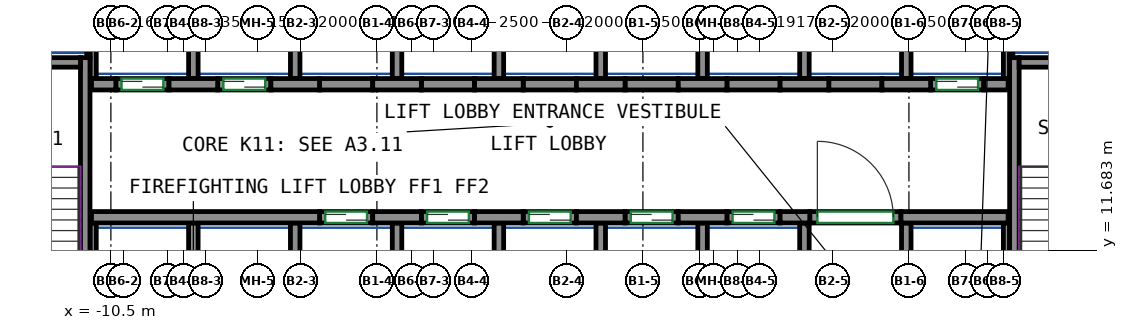
"""IFC4 building model, lengths in metres.
Left out: names, types, materials, properties, quantities, classifications, styles, units other than length and angle.
Written with IfcOpenShell. Run it as: python <this file> out.ifc"""

import sys

from ifc_helpers import new_model, si_unit, direction, frame, frame_2d, origin, place, context, subcontext, project, spatial, rectangle, extrude, source, transform, mapped, element, fill, save


model = new_model("IFC4")
c1 = context("Model", 3, precision=1e-05, world=origin(), true_north=direction((0.0, 1.0)))
c2 = subcontext(c1, "Body", "Model", "MODEL_VIEW")
j1 = project(units=[si_unit("LENGTHUNIT", "METRE"), si_unit("PLANEANGLEUNIT", "RADIAN")], contexts=[c1])
p1 = place(None, origin())
s1 = spatial("IfcSite", under=j1, at=p1, CompositionType="ELEMENT")
p2 = place(p1, origin())
s2 = spatial("IfcBuilding", under=s1, at=p2, CompositionType="ELEMENT")
p3 = place(p2, frame((0.0, 0.0, 47.0)))
s3 = spatial("IfcBuildingStorey", under=s2, at=p3, CompositionType="ELEMENT", Elevation=47.0)
m1 = source(origin(), c2, "Body", "SweptSolid", [
    extrude(rectangle(XDim=7.75, YDim=0.25, at=frame_2d((3.875, 0.0))), origin(), (0.0, 0.0, 1.0), 3.72),
])
p4 = place(p3, frame((-11.175, 9.0, 0.0), z_axis=(0.0, 0.0, 1.0), x_axis=(0.0, 1.0, 0.0)))
e1 = element("IfcWall", 1, at=p4, inside=s3, PredefinedType="SHEAR", context=c2, shape_type="MappedRepresentation", body=[
    mapped(m1, transform((0.0, 0.0, 0.0))),
])
m2 = source(origin(), c2, "Body", "SweptSolid", [
    extrude(rectangle(XDim=3.7, YDim=0.25, at=frame_2d((1.85, 0.0))), origin(), (0.0, 0.0, 1.0), 3.72),
])
p5 = place(p3, frame((-15.0, 16.625, 0.0), z_axis=(0.0, 0.0, 1.0), x_axis=(1.0, 0.0, 0.0)))
e2 = element("IfcWall", 2, at=p5, inside=s3, PredefinedType="SHEAR", context=c2, shape_type="MappedRepresentation", body=[
    mapped(m2, transform((0.0, 0.0, 0.0))),
])
p6 = place(p3, frame((13.275, 9.0, 0.0), z_axis=(0.0, 0.0, 1.0), x_axis=(0.0, 1.0, 0.0)))
e3 = element("IfcWall", 3, at=p6, inside=s3, PredefinedType="SHEAR", context=c2, shape_type="MappedRepresentation", body=[
    mapped(m1, transform((0.0, 0.0, 0.0))),
])
m3 = source(origin(), c2, "Body", "SweptSolid", [
    extrude(rectangle(XDim=3.7, YDim=0.25, at=frame_2d((1.85, 0.0))), origin(), (0.0, 0.0, 1.0), 3.72),
])
p7 = place(p3, frame((13.4, 16.625, 0.0), z_axis=(0.0, 0.0, 1.0), x_axis=(1.0, 0.0, 0.0)))
e4 = element("IfcWall", 4, at=p7, inside=s3, PredefinedType="SHEAR", context=c2, shape_type="MappedRepresentation", body=[
    mapped(m3, transform((0.0, 0.0, 0.0))),
])
m4 = source(origin(), c2, "Body", "SweptSolid", [
    extrude(rectangle(XDim=6.0, YDim=0.3, at=frame_2d((3.0, 0.0))), origin(), (0.0, 0.0, 1.0), 3.72),
])
p8 = place(p3, frame((-11.01, 12.55, 0.0), z_axis=(0.0, 0.0, 1.0), x_axis=(1.0, 0.0, 0.0)))
e5 = element("IfcWall", 5, at=p8, inside=s3, PredefinedType="SHEAR", context=c2, shape_type="MappedRepresentation", body=[
    mapped(m4, transform((0.0, 0.0, 0.0))),
])
m5 = source(origin(), c2, "Body", "SweptSolid", [
    extrude(rectangle(XDim=1.28, YDim=0.3, at=frame_2d((0.64, 0.0))), origin(), (0.0, 0.0, 1.0), 3.72),
])
for number, where, z_axis, x_axis in (
    (6, (-3.61, 12.55, 0.0), (0.0, 0.0, 1.0), (1.0, 0.0, 0.0)),
    (7, (-0.93, 12.55, 0.0), (0.0, 0.0, 1.0), (1.0, 0.0, 0.0)),
    (8, (1.75, 12.55, 0.0), (0.0, 0.0, 1.0), (1.0, 0.0, 0.0)),
    (9, (4.43, 12.55, 0.0), (0.0, 0.0, 1.0), (1.0, 0.0, 0.0)),
):
    element("IfcWall", number, at=place(p3, frame(where, z_axis=z_axis, x_axis=x_axis)), inside=s3, PredefinedType="SHEAR", context=c2, shape_type="MappedRepresentation", body=[
        mapped(m5, transform((0.0, 0.0, 0.0))),
    ])
m6 = source(origin(), c2, "Body", "SweptSolid", [
    extrude(rectangle(XDim=0.78, YDim=0.3, at=frame_2d((0.39, 0.0))), origin(), (0.0, 0.0, 1.0), 3.72),
])
p9 = place(p3, frame((7.11, 12.55, 0.0), z_axis=(0.0, 0.0, 1.0), x_axis=(1.0, 0.0, 0.0)))
e10 = element("IfcWall", 10, at=p9, inside=s3, PredefinedType="SHEAR", context=c2, shape_type="MappedRepresentation", body=[
    mapped(m6, transform((0.0, 0.0, 0.0))),
])
m7 = source(origin(), c2, "Body", "SweptSolid", [
    extrude(rectangle(XDim=2.82, YDim=0.3, at=frame_2d((1.41, 0.0))), origin(), (0.0, 0.0, 1.0), 3.72),
])
p10 = place(p3, frame((10.29, 12.55, 0.0), z_axis=(0.0, 0.0, 1.0), x_axis=(1.0, 0.0, 0.0)))
e11 = element("IfcWall", 11, at=p10, inside=s3, PredefinedType="SHEAR", context=c2, shape_type="MappedRepresentation", body=[
    mapped(m7, transform((0.0, 0.0, 0.0))),
])
m8 = source(origin(), c2, "Body", "SweptSolid", [
    extrude(rectangle(XDim=0.64, YDim=0.3, at=frame_2d((0.32, 0.0))), origin(), (0.0, 0.0, 1.0), 3.72),
])
p11 = place(p3, frame((-11.01, 16.05, 0.0), z_axis=(0.0, 0.0, 1.0), x_axis=(1.0, 0.0, 0.0)))
e12 = element("IfcWall", 12, at=p11, inside=s3, PredefinedType="SHEAR", context=c2, shape_type="MappedRepresentation", body=[
    mapped(m8, transform((0.0, 0.0, 0.0))),
])
for number, where, z_axis, x_axis in (
    (13, (-8.97, 16.05, 0.0), (0.0, 0.0, 1.0), (1.0, 0.0, 0.0)),
    (14, (-6.29, 16.05, 0.0), (0.0, 0.0, 1.0), (1.0, 0.0, 0.0)),
    (15, (-3.61, 16.05, 0.0), (0.0, 0.0, 1.0), (1.0, 0.0, 0.0)),
    (16, (-0.93, 16.05, 0.0), (0.0, 0.0, 1.0), (1.0, 0.0, 0.0)),
    (17, (1.75, 16.05, 0.0), (0.0, 0.0, 1.0), (1.0, 0.0, 0.0)),
    (18, (4.43, 16.05, 0.0), (0.0, 0.0, 1.0), (1.0, 0.0, 0.0)),
):
    element("IfcWall", number, at=place(p3, frame(where, z_axis=z_axis, x_axis=x_axis)), inside=s3, PredefinedType="SHEAR", context=c2, shape_type="MappedRepresentation", body=[
        mapped(m5, transform((0.0, 0.0, 0.0))),
    ])
m9 = source(origin(), c2, "Body", "SweptSolid", [
    extrude(rectangle(XDim=1.28, YDim=0.3, at=frame_2d((0.64, 0.0))), origin(), (0.0, 0.0, 1.0), 3.72),
])
p12 = place(p3, frame((7.11, 16.05, 0.0), z_axis=(0.0, 0.0, 1.0), x_axis=(1.0, 0.0, 0.0)))
e19 = element("IfcWall", 19, at=p12, inside=s3, PredefinedType="SHEAR", context=c2, shape_type="MappedRepresentation", body=[
    mapped(m9, transform((0.0, 0.0, 0.0))),
])
p13 = place(p3, frame((9.79, 16.05, 0.0), z_axis=(0.0, 0.0, 1.0), x_axis=(1.0, 0.0, 0.0)))
e20 = element("IfcWall", 20, at=p13, inside=s3, PredefinedType="SHEAR", context=c2, shape_type="MappedRepresentation", body=[
    mapped(m5, transform((0.0, 0.0, 0.0))),
])
m10 = source(origin(), c2, "Body", "SweptSolid", [
    extrude(rectangle(XDim=0.64, YDim=0.3, at=frame_2d((0.32, 0.0))), origin(), (0.0, 0.0, 1.0), 3.72),
])
p14 = place(p3, frame((12.47, 16.05, 0.0), z_axis=(0.0, 0.0, 1.0), x_axis=(1.0, 0.0, 0.0)))
e21 = element("IfcWall", 21, at=p14, inside=s3, PredefinedType="SHEAR", context=c2, shape_type="MappedRepresentation", body=[
    mapped(m10, transform((0.0, 0.0, 0.0))),
])
m11 = source(origin(), c2, "Body", "SweptSolid", [
    extrude(rectangle(XDim=1.4, YDim=0.3, at=frame_2d((0.7, 0.0))), origin(), (0.0, 0.0, 1.0), 3.72),
])
p15 = place(p3, frame((-5.01, 12.55, 0.0), z_axis=(0.0, 0.0, 1.0), x_axis=(1.0, 0.0, 0.0)))
e22 = element("IfcWall", 22, at=p15, inside=s3, PredefinedType="PARTITIONING", context=c2, shape_type="MappedRepresentation", body=[
    mapped(m11, transform((0.0, 0.0, 0.0))),
])
p16 = place(p15, frame((0.15, 0.0, 0.0)))
e23 = element("IfcOpeningElement", 23, at=p16, cuts=e22, PredefinedType="OPENING", context=c2, shape_type="SweptSolid", body=[
    extrude(rectangle(XDim=1.1, YDim=2.1, at=frame_2d((0.55, 1.05))), frame((0.0, 0.16, 0.0), z_axis=(0.0, -1.0, 0.0), x_axis=(1.0, 0.0, 0.0)), (0.0, 0.0, 1.0), 0.32),
])
m12 = source(origin(), c2, "Body", "SweptSolid", [
    extrude(rectangle(XDim=1.4, YDim=0.3, at=frame_2d((0.7, 0.0))), origin(), (0.0, 0.0, 1.0), 3.72),
])
p17 = place(p3, frame((-2.33, 12.55, 0.0), z_axis=(0.0, 0.0, 1.0), x_axis=(1.0, 0.0, 0.0)))
e24 = element("IfcWall", 24, at=p17, inside=s3, PredefinedType="PARTITIONING", context=c2, shape_type="MappedRepresentation", body=[
    mapped(m12, transform((0.0, 0.0, 0.0))),
])
p18 = place(p17, frame((0.15, 0.0, 0.0)))
e25 = element("IfcOpeningElement", 25, at=p18, cuts=e24, PredefinedType="OPENING", context=c2, shape_type="SweptSolid", body=[
    extrude(rectangle(XDim=1.1, YDim=2.1, at=frame_2d((0.55, 1.05))), frame((0.0, 0.16, 0.0), z_axis=(0.0, -1.0, 0.0), x_axis=(1.0, 0.0, 0.0)), (0.0, 0.0, 1.0), 0.32),
])
p19 = place(p3, frame((0.35, 12.55, 0.0), z_axis=(0.0, 0.0, 1.0), x_axis=(1.0, 0.0, 0.0)))
e26 = element("IfcWall", 26, at=p19, inside=s3, PredefinedType="PARTITIONING", context=c2, shape_type="MappedRepresentation", body=[
    mapped(m11, transform((0.0, 0.0, 0.0))),
])
p20 = place(p19, frame((0.15, 0.0, 0.0)))
e27 = element("IfcOpeningElement", 27, at=p20, cuts=e26, PredefinedType="OPENING", context=c2, shape_type="SweptSolid", body=[
    extrude(rectangle(XDim=1.1, YDim=2.1, at=frame_2d((0.55, 1.05))), frame((0.0, 0.16, 0.0), z_axis=(0.0, -1.0, 0.0), x_axis=(1.0, 0.0, 0.0)), (0.0, 0.0, 1.0), 0.32),
])
p21 = place(p3, frame((3.03, 12.55, 0.0), z_axis=(0.0, 0.0, 1.0), x_axis=(1.0, 0.0, 0.0)))
e28 = element("IfcWall", 28, at=p21, inside=s3, PredefinedType="PARTITIONING", context=c2, shape_type="MappedRepresentation", body=[
    mapped(m11, transform((0.0, 0.0, 0.0))),
])
p22 = place(p21, frame((0.15, 0.0, 0.0)))
e29 = element("IfcOpeningElement", 29, at=p22, cuts=e28, PredefinedType="OPENING", context=c2, shape_type="SweptSolid", body=[
    extrude(rectangle(XDim=1.1, YDim=2.1, at=frame_2d((0.55, 1.05))), frame((0.0, 0.16, 0.0), z_axis=(0.0, -1.0, 0.0), x_axis=(1.0, 0.0, 0.0)), (0.0, 0.0, 1.0), 0.32),
])
p23 = place(p3, frame((5.71, 12.55, 0.0), z_axis=(0.0, 0.0, 1.0), x_axis=(1.0, 0.0, 0.0)))
e30 = element("IfcWall", 30, at=p23, inside=s3, PredefinedType="PARTITIONING", context=c2, shape_type="MappedRepresentation", body=[
    mapped(m12, transform((0.0, 0.0, 0.0))),
])
p24 = place(p23, frame((0.15, 0.0, 0.0)))
e31 = element("IfcOpeningElement", 31, at=p24, cuts=e30, PredefinedType="OPENING", context=c2, shape_type="SweptSolid", body=[
    extrude(rectangle(XDim=1.1, YDim=2.1, at=frame_2d((0.55, 1.05))), frame((0.0, 0.16, 0.0), z_axis=(0.0, -1.0, 0.0), x_axis=(1.0, 0.0, 0.0)), (0.0, 0.0, 1.0), 0.32),
])
p25 = place(p3, frame((11.07, 16.05, 0.0), z_axis=(0.0, 0.0, 1.0), x_axis=(1.0, 0.0, 0.0)))
e32 = element("IfcWall", 32, at=p25, inside=s3, PredefinedType="PARTITIONING", context=c2, shape_type="MappedRepresentation", body=[
    mapped(m11, transform((0.0, 0.0, 0.0))),
])
p26 = place(p25, frame((0.15, 0.0, 0.0)))
e33 = element("IfcOpeningElement", 33, at=p26, cuts=e32, PredefinedType="OPENING", context=c2, shape_type="SweptSolid", body=[
    extrude(rectangle(XDim=1.1, YDim=2.1, at=frame_2d((0.55, 1.05))), frame((0.0, 0.16, 0.0), z_axis=(0.0, -1.0, 0.0), x_axis=(1.0, 0.0, 0.0)), (0.0, 0.0, 1.0), 0.32),
])
p27 = place(p3, frame((-10.37, 16.05, 0.0), z_axis=(0.0, 0.0, 1.0), x_axis=(1.0, 0.0, 0.0)))
e34 = element("IfcWall", 34, at=p27, inside=s3, PredefinedType="PARTITIONING", context=c2, shape_type="MappedRepresentation", body=[
    mapped(m12, transform((0.0, 0.0, 0.0))),
])
p28 = place(p27, frame((0.15, 0.0, 0.0)))
e35 = element("IfcOpeningElement", 35, at=p28, cuts=e34, PredefinedType="OPENING", context=c2, shape_type="SweptSolid", body=[
    extrude(rectangle(XDim=1.1, YDim=2.1, at=frame_2d((0.55, 1.05))), frame((0.0, 0.16, 0.0), z_axis=(0.0, -1.0, 0.0), x_axis=(1.0, 0.0, 0.0)), (0.0, 0.0, 1.0), 0.32),
])
p29 = place(p3, frame((-7.69, 16.05, 0.0), z_axis=(0.0, 0.0, 1.0), x_axis=(1.0, 0.0, 0.0)))
e36 = element("IfcWall", 36, at=p29, inside=s3, PredefinedType="PARTITIONING", context=c2, shape_type="MappedRepresentation", body=[
    mapped(m11, transform((0.0, 0.0, 0.0))),
])
p30 = place(p29, frame((0.15, 0.0, 0.0)))
e37 = element("IfcOpeningElement", 37, at=p30, cuts=e36, PredefinedType="OPENING", context=c2, shape_type="SweptSolid", body=[
    extrude(rectangle(XDim=1.1, YDim=2.1, at=frame_2d((0.55, 1.05))), frame((0.0, 0.16, 0.0), z_axis=(0.0, -1.0, 0.0), x_axis=(1.0, 0.0, 0.0)), (0.0, 0.0, 1.0), 0.32),
])
m13 = source(origin(), c2, "Body", "SweptSolid", [
    extrude(rectangle(XDim=2.4, YDim=0.3, at=frame_2d((1.2, 0.0))), origin(), (0.0, 0.0, 1.0), 3.72),
])
p31 = place(p3, frame((7.89, 12.55, 0.0), z_axis=(0.0, 0.0, 1.0), x_axis=(1.0, 0.0, 0.0)))
e38 = element("IfcWall", 38, at=p31, inside=s3, PredefinedType="PARTITIONING", context=c2, shape_type="MappedRepresentation", body=[
    mapped(m13, transform((0.0, 0.0, 0.0))),
])
p32 = place(p31, frame((0.2, 0.0, 0.0)))
e39 = element("IfcOpeningElement", 39, at=p32, cuts=e38, PredefinedType="OPENING", context=c2, shape_type="SweptSolid", body=[
    extrude(rectangle(XDim=2.0, YDim=2.1, at=frame_2d((1.0, 1.05))), frame((0.0, 0.16, 0.0), z_axis=(0.0, -1.0, 0.0), x_axis=(1.0, 0.0, 0.0)), (0.0, 0.0, 1.0), 0.32),
])
p33 = place(p3, frame((-5.01, 16.05, 0.0), z_axis=(0.0, 0.0, 1.0), x_axis=(1.0, 0.0, 0.0)))
e40 = element("IfcWall", 40, at=p33, inside=s3, PredefinedType="PARTITIONING", context=c2, shape_type="MappedRepresentation", body=[
    mapped(m11, transform((0.0, 0.0, 0.0))),
])
p34 = place(p3, frame((-2.33, 16.05, 0.0), z_axis=(0.0, 0.0, 1.0), x_axis=(1.0, 0.0, 0.0)))
e41 = element("IfcWall", 41, at=p34, inside=s3, PredefinedType="PARTITIONING", context=c2, shape_type="MappedRepresentation", body=[
    mapped(m12, transform((0.0, 0.0, 0.0))),
])
for number, where, z_axis, x_axis in (
    (42, (0.35, 16.05, 0.0), (0.0, 0.0, 1.0), (1.0, 0.0, 0.0)),
    (43, (3.03, 16.05, 0.0), (0.0, 0.0, 1.0), (1.0, 0.0, 0.0)),
):
    element("IfcWall", number, at=place(p3, frame(where, z_axis=z_axis, x_axis=x_axis)), inside=s3, PredefinedType="PARTITIONING", context=c2, shape_type="MappedRepresentation", body=[
        mapped(m11, transform((0.0, 0.0, 0.0))),
    ])
for number, where, z_axis, x_axis in (
    (44, (5.71, 16.05, 0.0), (0.0, 0.0, 1.0), (1.0, 0.0, 0.0)),
    (45, (8.39, 16.05, 0.0), (0.0, 0.0, 1.0), (1.0, 0.0, 0.0)),
):
    element("IfcWall", number, at=place(p3, frame(where, z_axis=z_axis, x_axis=x_axis)), inside=s3, PredefinedType="PARTITIONING", context=c2, shape_type="MappedRepresentation", body=[
        mapped(m12, transform((0.0, 0.0, 0.0))),
    ])
m14 = source(origin(), c2, "Body", "SweptSolid", [
    extrude(rectangle(XDim=3.275, YDim=0.165, at=frame_2d((1.638, 0.0))), origin(), (0.0, 0.0, 1.0), 3.72),
])
for number, where, z_axis, x_axis in (
    (46, (13.067, 16.2, 0.0), (0.0, 0.0, 1.0), (0.0, 1.0, 0.0)),
    (47, (-10.968, 16.2, 0.0), (0.0, 0.0, 1.0), (0.0, 1.0, 0.0)),
):
    element("IfcWall", number, at=place(p3, frame(where, z_axis=z_axis, x_axis=x_axis)), inside=s3, PredefinedType="PARTITIONING", context=c2, shape_type="MappedRepresentation", body=[
        mapped(m14, transform((0.0, 0.0, 0.0))),
    ])
m15 = source(origin(), c2, "Body", "SweptSolid", [
    extrude(rectangle(XDim=3.275, YDim=0.25, at=frame_2d((1.638, 0.0))), origin(), (0.0, 0.0, 1.0), 3.72),
])
p35 = place(p3, frame((10.43, 16.2, 0.0), z_axis=(0.0, 0.0, 1.0), x_axis=(0.0, 1.0, 0.0)))
e48 = element("IfcWall", 48, at=p35, inside=s3, PredefinedType="PARTITIONING", context=c2, shape_type="MappedRepresentation", body=[
    mapped(m15, transform((0.0, 0.0, 0.0))),
])
m16 = source(origin(), c2, "Body", "SweptSolid", [
    extrude(rectangle(XDim=2.725, YDim=0.085, at=frame_2d((1.363, 0.0))), origin(), (0.0, 0.0, 1.0), 3.72),
])
p36 = place(p3, frame((13.192, 16.75, 0.0), z_axis=(0.0, 0.0, 1.0), x_axis=(0.0, 1.0, 0.0)))
e49 = element("IfcWall", 49, at=p36, inside=s3, PredefinedType="PARTITIONING", context=c2, shape_type="MappedRepresentation", body=[
    mapped(m16, transform((0.0, 0.0, 0.0))),
])
for number, where, z_axis, x_axis in (
    (50, (2.39, 16.2, 0.0), (0.0, 0.0, 1.0), (0.0, 1.0, 0.0)),
    (51, (5.07, 16.2, 0.0), (0.0, 0.0, 1.0), (0.0, 1.0, 0.0)),
    (52, (7.75, 16.2, 0.0), (0.0, 0.0, 1.0), (0.0, 1.0, 0.0)),
    (53, (-0.29, 16.2, 0.0), (0.0, 0.0, 1.0), (0.0, 1.0, 0.0)),
):
    element("IfcWall", number, at=place(p3, frame(where, z_axis=z_axis, x_axis=x_axis)), inside=s3, PredefinedType="PARTITIONING", context=c2, shape_type="MappedRepresentation", body=[
        mapped(m15, transform((0.0, 0.0, 0.0))),
    ])
p37 = place(p3, frame((-11.093, 16.75, 0.0), z_axis=(0.0, 0.0, 1.0), x_axis=(0.0, 1.0, 0.0)))
e54 = element("IfcWall", 54, at=p37, inside=s3, PredefinedType="PARTITIONING", context=c2, shape_type="MappedRepresentation", body=[
    mapped(m16, transform((0.0, 0.0, 0.0))),
])
for number, where, z_axis, x_axis in (
    (55, (-2.97, 16.2, 0.0), (0.0, 0.0, 1.0), (0.0, 1.0, 0.0)),
    (56, (-5.65, 16.2, 0.0), (0.0, 0.0, 1.0), (0.0, 1.0, 0.0)),
    (57, (-8.33, 16.2, 0.0), (0.0, 0.0, 1.0), (0.0, 1.0, 0.0)),
):
    element("IfcWall", number, at=place(p3, frame(where, z_axis=z_axis, x_axis=x_axis)), inside=s3, PredefinedType="PARTITIONING", context=c2, shape_type="MappedRepresentation", body=[
        mapped(m15, transform((0.0, 0.0, 0.0))),
    ])
m17 = source(origin(), c2, "Body", "SweptSolid", [
    extrude(rectangle(XDim=3.4, YDim=0.25, at=frame_2d((1.7, 0.0))), origin(), (0.0, 0.0, 1.0), 3.72),
])
p38 = place(p3, frame((10.43, 9.0, 0.0), z_axis=(0.0, 0.0, 1.0), x_axis=(0.0, 1.0, 0.0)))
e58 = element("IfcWall", 58, at=p38, inside=s3, PredefinedType="PARTITIONING", context=c2, shape_type="MappedRepresentation", body=[
    mapped(m17, transform((0.0, 0.0, 0.0))),
])
m18 = source(origin(), c2, "Body", "SweptSolid", [
    extrude(rectangle(XDim=3.4, YDim=0.165, at=frame_2d((1.7, 0.0))), origin(), (0.0, 0.0, 1.0), 3.72),
])
p39 = place(p3, frame((13.067, 9.0, 0.0), z_axis=(0.0, 0.0, 1.0), x_axis=(0.0, 1.0, 0.0)))
e59 = element("IfcWall", 59, at=p39, inside=s3, PredefinedType="PARTITIONING", context=c2, shape_type="MappedRepresentation", body=[
    mapped(m18, transform((0.0, 0.0, 0.0))),
])
for number, where, z_axis, x_axis in (
    (60, (2.39, 9.0, 0.0), (0.0, 0.0, 1.0), (0.0, 1.0, 0.0)),
    (61, (5.07, 9.0, 0.0), (0.0, 0.0, 1.0), (0.0, 1.0, 0.0)),
    (62, (7.75, 9.0, 0.0), (0.0, 0.0, 1.0), (0.0, 1.0, 0.0)),
    (63, (-0.29, 9.0, 0.0), (0.0, 0.0, 1.0), (0.0, 1.0, 0.0)),
):
    element("IfcWall", number, at=place(p3, frame(where, z_axis=z_axis, x_axis=x_axis)), inside=s3, PredefinedType="PARTITIONING", context=c2, shape_type="MappedRepresentation", body=[
        mapped(m17, transform((0.0, 0.0, 0.0))),
    ])
p40 = place(p3, frame((-10.968, 9.0, 0.0), z_axis=(0.0, 0.0, 1.0), x_axis=(0.0, 1.0, 0.0)))
e64 = element("IfcWall", 64, at=p40, inside=s3, PredefinedType="PARTITIONING", context=c2, shape_type="MappedRepresentation", body=[
    mapped(m18, transform((0.0, 0.0, 0.0))),
])
for number, where, z_axis, x_axis in (
    (65, (-2.97, 9.0, 0.0), (0.0, 0.0, 1.0), (0.0, 1.0, 0.0)),
    (66, (-5.65, 9.0, 0.0), (0.0, 0.0, 1.0), (0.0, 1.0, 0.0)),
    (67, (-8.33, 9.0, 0.0), (0.0, 0.0, 1.0), (0.0, 1.0, 0.0)),
):
    element("IfcWall", number, at=place(p3, frame(where, z_axis=z_axis, x_axis=x_axis)), inside=s3, PredefinedType="PARTITIONING", context=c2, shape_type="MappedRepresentation", body=[
        mapped(m17, transform((0.0, 0.0, 0.0))),
    ])
p41 = place(p32, origin())
e68 = element("IfcDoor", 68, at=p41, inside=s3, OperationType="DOUBLE_DOOR_SINGLE_SWING", PredefinedType="DOOR", context=c2, shape_type="SweptSolid", body=[
    extrude(rectangle(XDim=2.0, YDim=2.1, at=frame_2d((1.0, 1.05))), frame((0.0, 0.025, 0.0), z_axis=(0.0, -1.0, 0.0), x_axis=(1.0, 0.0, 0.0)), (0.0, 0.0, 1.0), 0.05),
])
fill(e39, e68)
p42 = place(p16, origin())
e69 = element("IfcDoor", 69, at=p42, inside=s3, OperationType="DOUBLE_DOOR_SLIDING", PredefinedType="DOOR", context=c2, shape_type="SweptSolid", body=[
    extrude(rectangle(XDim=1.1, YDim=2.1, at=frame_2d((0.55, 1.05))), frame((0.0, 0.025, 0.0), z_axis=(0.0, -1.0, 0.0), x_axis=(1.0, 0.0, 0.0)), (0.0, 0.0, 1.0), 0.05),
])
fill(e23, e69)
p43 = place(p18, origin())
e70 = element("IfcDoor", 70, at=p43, inside=s3, OperationType="DOUBLE_DOOR_SLIDING", PredefinedType="DOOR", context=c2, shape_type="SweptSolid", body=[
    extrude(rectangle(XDim=1.1, YDim=2.1, at=frame_2d((0.55, 1.05))), frame((0.0, 0.025, 0.0), z_axis=(0.0, -1.0, 0.0), x_axis=(1.0, 0.0, 0.0)), (0.0, 0.0, 1.0), 0.05),
])
fill(e25, e70)
p44 = place(p20, origin())
e71 = element("IfcDoor", 71, at=p44, inside=s3, OperationType="DOUBLE_DOOR_SLIDING", PredefinedType="DOOR", context=c2, shape_type="SweptSolid", body=[
    extrude(rectangle(XDim=1.1, YDim=2.1, at=frame_2d((0.55, 1.05))), frame((0.0, 0.025, 0.0), z_axis=(0.0, -1.0, 0.0), x_axis=(1.0, 0.0, 0.0)), (0.0, 0.0, 1.0), 0.05),
])
fill(e27, e71)
p45 = place(p22, origin())
e72 = element("IfcDoor", 72, at=p45, inside=s3, OperationType="DOUBLE_DOOR_SLIDING", PredefinedType="DOOR", context=c2, shape_type="SweptSolid", body=[
    extrude(rectangle(XDim=1.1, YDim=2.1, at=frame_2d((0.55, 1.05))), frame((0.0, 0.025, 0.0), z_axis=(0.0, -1.0, 0.0), x_axis=(1.0, 0.0, 0.0)), (0.0, 0.0, 1.0), 0.05),
])
fill(e29, e72)
p46 = place(p24, origin())
e73 = element("IfcDoor", 73, at=p46, inside=s3, OperationType="DOUBLE_DOOR_SLIDING", PredefinedType="DOOR", context=c2, shape_type="SweptSolid", body=[
    extrude(rectangle(XDim=1.1, YDim=2.1, at=frame_2d((0.55, 1.05))), frame((0.0, 0.025, 0.0), z_axis=(0.0, -1.0, 0.0), x_axis=(1.0, 0.0, 0.0)), (0.0, 0.0, 1.0), 0.05),
])
fill(e31, e73)
p47 = place(p26, origin())
e74 = element("IfcDoor", 74, at=p47, inside=s3, OperationType="DOUBLE_DOOR_SLIDING", PredefinedType="DOOR", context=c2, shape_type="SweptSolid", body=[
    extrude(rectangle(XDim=1.1, YDim=2.1, at=frame_2d((0.55, 1.05))), frame((0.0, 0.025, 0.0), z_axis=(0.0, -1.0, 0.0), x_axis=(1.0, 0.0, 0.0)), (0.0, 0.0, 1.0), 0.05),
])
fill(e33, e74)
p48 = place(p28, origin())
e75 = element("IfcDoor", 75, at=p48, inside=s3, OperationType="DOUBLE_DOOR_SLIDING", PredefinedType="DOOR", context=c2, shape_type="SweptSolid", body=[
    extrude(rectangle(XDim=1.1, YDim=2.1, at=frame_2d((0.55, 1.05))), frame((0.0, 0.025, 0.0), z_axis=(0.0, -1.0, 0.0), x_axis=(1.0, 0.0, 0.0)), (0.0, 0.0, 1.0), 0.05),
])
fill(e35, e75)
p49 = place(p30, origin())
e76 = element("IfcDoor", 76, at=p49, inside=s3, OperationType="DOUBLE_DOOR_SLIDING", PredefinedType="DOOR", context=c2, shape_type="SweptSolid", body=[
    extrude(rectangle(XDim=1.1, YDim=2.1, at=frame_2d((0.55, 1.05))), frame((0.0, 0.025, 0.0), z_axis=(0.0, -1.0, 0.0), x_axis=(1.0, 0.0, 0.0)), (0.0, 0.0, 1.0), 0.05),
])
fill(e37, e76)
save(model, sys.argv[1])
